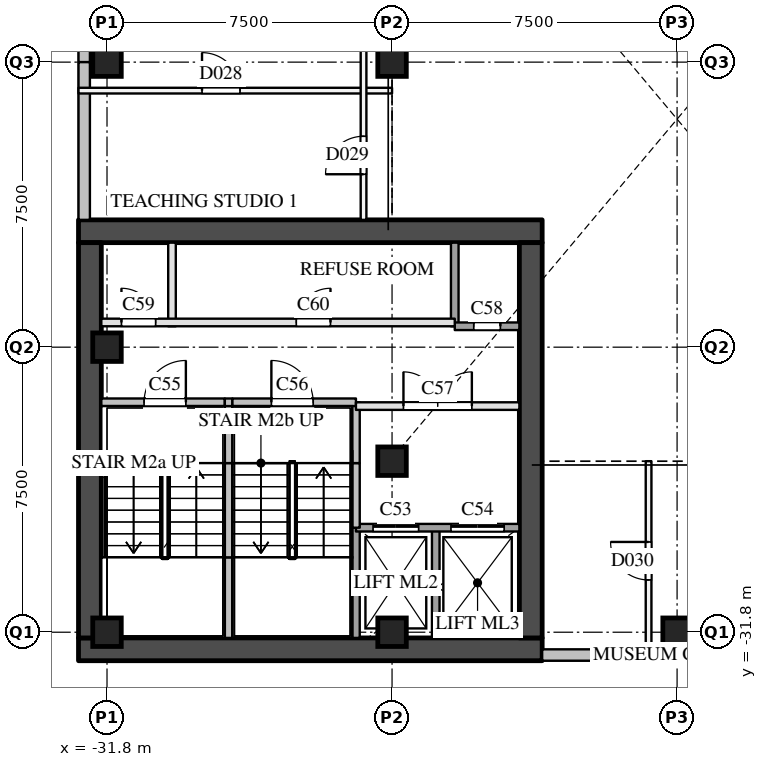
"""IFC4 building model, lengths in metres.
Left out: names, types, materials, properties, quantities, classifications, styles, units other than length and angle.
Written with IfcOpenShell. Run it as: python <this file> out.ifc"""

import sys

from ifc_helpers import new_model, si_unit, direction, frame, frame_2d, origin, origin_2d, place, context, subcontext, project, spatial, rectangle, extrude, element, fill, save


model = new_model("IFC4")
c1 = context("Model", 3, precision=1e-05, world=origin(), true_north=direction((0.0, 1.0)))
c2 = subcontext(c1, "Body", "Model", "MODEL_VIEW")
j1 = project(units=[si_unit("LENGTHUNIT", "METRE"), si_unit("PLANEANGLEUNIT", "RADIAN")], contexts=[c1])
p1 = place(None, origin())
s1 = spatial("IfcSite", under=j1, at=p1, CompositionType="ELEMENT")
p2 = place(p1, origin())
s2 = spatial("IfcBuilding", under=s1, at=p2, CompositionType="ELEMENT")
p3 = place(p2, frame((0.0, 0.0, 8.0)))
s3 = spatial("IfcBuildingStorey", under=s2, at=p3, CompositionType="ELEMENT", Elevation=8.0)
for number, where, z_axis, x_axis in (
    (1, (-31.8, -31.8, 0.0), (0.0, 0.0, 1.0), (1.0, 0.0, 0.0)),
    (2, (-31.8, -24.3, 0.0), (0.0, 0.0, 1.0), (1.0, 0.0, 0.0)),
    (3, (-31.8, -16.8, 0.0), (0.0, 0.0, 1.0), (1.0, 0.0, 0.0)),
    (4, (-24.3, -31.8, 0.0), (0.0, 0.0, 1.0), (1.0, 0.0, 0.0)),
    (5, (-24.3, -16.8, 0.0), (0.0, 0.0, 1.0), (1.0, 0.0, 0.0)),
    (6, (-16.8, -31.8, 0.0), (0.0, 0.0, 1.0), (1.0, 0.0, 0.0)),
    (7, (-24.3, -27.3, 0.0), (0.0, 0.0, 1.0), (1.0, 0.0, 0.0)),
):
    element("IfcColumn", number, at=place(p3, frame(where, z_axis=z_axis, x_axis=x_axis)), inside=s3, PredefinedType="COLUMN", context=c2, shape_type="SweptSolid", body=[
        extrude(rectangle(XDim=0.75, YDim=0.75, at=origin_2d()), origin(), (0.0, 0.0, 1.0), 6.0),
    ])
p4 = place(p3, frame((-20.35, -32.4, 0.0), z_axis=(0.0, 0.0, 1.0), x_axis=(1.0, 0.0, 0.0)))
e8 = element("IfcWall", 8, at=p4, inside=s3, PredefinedType="SOLIDWALL", context=c2, shape_type="SweptSolid", body=[
    extrude(rectangle(XDim=3.55, YDim=0.3, at=frame_2d((1.775, 0.0))), origin(), (0.0, 0.0, 1.0), 5.59),
])
p5 = place(p3, frame((-16.8, -32.4, 0.0), z_axis=(0.0, 0.0, 1.0), x_axis=(1.0, 0.0, 0.0)))
e9 = element("IfcWall", 9, at=p5, inside=s3, PredefinedType="SOLIDWALL", context=c2, shape_type="SweptSolid", body=[
    extrude(rectangle(XDim=7.5, YDim=0.3, at=frame_2d((3.75, 0.0))), origin(), (0.0, 0.0, 1.0), 5.59),
])
p6 = place(p5, frame((1.95, 0.0, 2.4)))
e10 = element("IfcOpeningElement", 10, at=p6, cuts=e9, PredefinedType="OPENING", context=c2, shape_type="SweptSolid", body=[
    extrude(rectangle(XDim=3.6, YDim=1.2, at=frame_2d((1.8, 0.6))), frame((0.0, 0.16, 0.0), z_axis=(0.0, -1.0, 0.0), x_axis=(1.0, 0.0, 0.0)), (0.0, 0.0, 1.0), 0.32),
])
p7 = place(p3, frame((-32.4, -9.3, 0.0), z_axis=(0.0, 0.0, 1.0), x_axis=(0.0, -1.0, 0.0)))
e11 = element("IfcWall", 11, at=p7, inside=s3, PredefinedType="SOLIDWALL", context=c2, shape_type="SweptSolid", body=[
    extrude(rectangle(XDim=7.5, YDim=0.3, at=frame_2d((3.75, 0.0))), origin(), (0.0, 0.0, 1.0), 5.59),
])
p8 = place(p7, frame((1.95, 0.0, 2.4)))
e12 = element("IfcOpeningElement", 12, at=p8, cuts=e11, PredefinedType="OPENING", context=c2, shape_type="SweptSolid", body=[
    extrude(rectangle(XDim=3.6, YDim=1.2, at=frame_2d((1.8, 0.6))), frame((0.0, 0.16, 0.0), z_axis=(0.0, -1.0, 0.0), x_axis=(1.0, 0.0, 0.0)), (0.0, 0.0, 1.0), 0.32),
])
p9 = place(p3, frame((-32.4, -16.8, 0.0), z_axis=(0.0, 0.0, 1.0), x_axis=(0.0, -1.0, 0.0)))
e13 = element("IfcWall", 13, at=p9, inside=s3, PredefinedType="SOLIDWALL", context=c2, shape_type="SweptSolid", body=[
    extrude(rectangle(XDim=4.15, YDim=0.3, at=frame_2d((2.075, 0.0))), origin(), (0.0, 0.0, 1.0), 5.59),
])
for number, where, z_axis, x_axis in (
    (14, (-32.55, -32.25, 0.0), (0.0, 0.0, 1.0), (1.0, 0.0, 0.0)),
    (15, (-32.55, -21.25, 0.0), (0.0, 0.0, 1.0), (1.0, 0.0, 0.0)),
):
    element("IfcWall", number, at=place(p3, frame(where, z_axis=z_axis, x_axis=x_axis)), inside=s3, PredefinedType="SHEAR", context=c2, shape_type="SweptSolid", body=[
        extrude(rectangle(XDim=12.2, YDim=0.6, at=frame_2d((6.1, 0.0))), origin(), (0.0, 0.0, 1.0), 5.59),
    ])
for number, where, z_axis, x_axis in (
    (16, (-32.25, -31.95, 0.0), (0.0, 0.0, 1.0), (0.0, 1.0, 0.0)),
    (17, (-20.65, -31.95, 0.0), (0.0, 0.0, 1.0), (0.0, 1.0, 0.0)),
):
    element("IfcWall", number, at=place(p3, frame(where, z_axis=z_axis, x_axis=x_axis)), inside=s3, PredefinedType="SHEAR", context=c2, shape_type="SweptSolid", body=[
        extrude(rectangle(XDim=10.4, YDim=0.6, at=frame_2d((5.2, 0.0))), origin(), (0.0, 0.0, 1.0), 5.59),
    ])
p10 = place(p3, frame((-30.09, -23.75, 0.0), z_axis=(0.0, 0.0, 1.0), x_axis=(0.0, 1.0, 0.0)))
e18 = element("IfcWall", 18, at=p10, inside=s3, PredefinedType="PARTITIONING", context=c2, shape_type="SweptSolid", body=[
    extrude(rectangle(XDim=2.2, YDim=0.2, at=frame_2d((1.1, 0.0))), origin(), (0.0, 0.0, 1.0), 5.59),
])
p11 = place(p3, frame((-28.6, -31.95, 0.0), z_axis=(0.0, 0.0, 1.0), x_axis=(0.0, 1.0, 0.0)))
e19 = element("IfcWall", 19, at=p11, inside=s3, PredefinedType="SOLIDWALL", context=c2, shape_type="SweptSolid", body=[
    extrude(rectangle(XDim=2.12, YDim=0.2, at=frame_2d((1.06, 0.0))), origin(), (0.0, 0.0, 1.0), 5.59),
])
p12 = place(p3, frame((-28.6, -29.83, 0.0), z_axis=(0.0, 0.0, 1.0), x_axis=(0.0, 1.0, 0.0)))
e20 = element("IfcWall", 20, at=p12, inside=s3, PredefinedType="SOLIDWALL", context=c2, shape_type="SweptSolid", body=[
    extrude(rectangle(XDim=2.48, YDim=0.2, at=frame_2d((1.24, 0.0))), origin(), (0.0, 0.0, 1.0), 5.59),
])
p13 = place(p3, frame((-28.6, -27.35, 0.0), z_axis=(0.0, 0.0, 1.0), x_axis=(0.0, 1.0, 0.0)))
e21 = element("IfcWall", 21, at=p13, inside=s3, PredefinedType="SOLIDWALL", context=c2, shape_type="SweptSolid", body=[
    extrude(rectangle(XDim=1.6, YDim=0.2, at=frame_2d((0.8, 0.0))), origin(), (0.0, 0.0, 1.0), 5.59),
])
p14 = place(p3, frame((-25.25, -31.95, 0.0), z_axis=(0.0, 0.0, 1.0), x_axis=(0.0, 1.0, 0.0)))
e22 = element("IfcWall", 22, at=p14, inside=s3, PredefinedType="SOLIDWALL", context=c2, shape_type="SweptSolid", body=[
    extrude(rectangle(XDim=2.9, YDim=0.2, at=frame_2d((1.45, 0.0))), origin(), (0.0, 0.0, 1.0), 5.59),
])
p15 = place(p3, frame((-25.25, -29.05, 0.0), z_axis=(0.0, 0.0, 1.0), x_axis=(0.0, 1.0, 0.0)))
e23 = element("IfcWall", 23, at=p15, inside=s3, PredefinedType="SOLIDWALL", context=c2, shape_type="SweptSolid", body=[
    extrude(rectangle(XDim=1.7, YDim=0.2, at=frame_2d((0.85, 0.0))), origin(), (0.0, 0.0, 1.0), 5.59),
])
p16 = place(p3, frame((-25.25, -27.35, 0.0), z_axis=(0.0, 0.0, 1.0), x_axis=(0.0, 1.0, 0.0)))
e24 = element("IfcWall", 24, at=p16, inside=s3, PredefinedType="SOLIDWALL", context=c2, shape_type="SweptSolid", body=[
    extrude(rectangle(XDim=1.6, YDim=0.2, at=frame_2d((0.8, 0.0))), origin(), (0.0, 0.0, 1.0), 5.59),
])
p17 = place(p3, frame((-23.15, -31.95, 0.0), z_axis=(0.0, 0.0, 1.0), x_axis=(0.0, 1.0, 0.0)))
e25 = element("IfcWall", 25, at=p17, inside=s3, PredefinedType="SOLIDWALL", context=c2, shape_type="SweptSolid", body=[
    extrude(rectangle(XDim=2.9, YDim=0.2, at=frame_2d((1.45, 0.0))), origin(), (0.0, 0.0, 1.0), 5.59),
])
p18 = place(p3, frame((-22.65, -23.75, 0.0), z_axis=(0.0, 0.0, 1.0), x_axis=(0.0, 1.0, 0.0)))
e26 = element("IfcWall", 26, at=p18, inside=s3, PredefinedType="SOLIDWALL", context=c2, shape_type="SweptSolid", body=[
    extrude(rectangle(XDim=2.2, YDim=0.2, at=frame_2d((1.1, 0.0))), origin(), (0.0, 0.0, 1.0), 5.59),
])
p19 = place(p3, frame((-25.25, -29.05, 0.0), z_axis=(0.0, 0.0, 1.0), x_axis=(1.0, 0.0, 0.0)))
e27 = element("IfcWall", 27, at=p19, inside=s3, PredefinedType="SOLIDWALL", context=c2, shape_type="SweptSolid", body=[
    extrude(rectangle(XDim=4.3, YDim=0.2, at=frame_2d((2.15, 0.0))), origin(), (0.0, 0.0, 1.0), 5.59),
])
p20 = place(p19, frame((0.45, 0.0, 0.0)))
e28 = element("IfcOpeningElement", 28, at=p20, cuts=e27, PredefinedType="OPENING", context=c2, shape_type="SweptSolid", body=[
    extrude(rectangle(XDim=1.2, YDim=2.1, at=frame_2d((0.6, 1.05))), frame((0.0, 0.11, 0.0), z_axis=(0.0, -1.0, 0.0), x_axis=(1.0, 0.0, 0.0)), (0.0, 0.0, 1.0), 0.22),
])
p21 = place(p19, frame((2.5, 0.0, 0.0)))
e29 = element("IfcOpeningElement", 29, at=p21, cuts=e27, PredefinedType="OPENING", context=c2, shape_type="SweptSolid", body=[
    extrude(rectangle(XDim=1.4, YDim=2.1, at=frame_2d((0.7, 1.05))), frame((0.0, 0.11, 0.0), z_axis=(0.0, -1.0, 0.0), x_axis=(1.0, 0.0, 0.0)), (0.0, 0.0, 1.0), 0.22),
])
p22 = place(p3, frame((-25.25, -25.85, 0.0), z_axis=(0.0, 0.0, 1.0), x_axis=(1.0, 0.0, 0.0)))
e30 = element("IfcWall", 30, at=p22, inside=s3, PredefinedType="PARTITIONING", context=c2, shape_type="SweptSolid", body=[
    extrude(rectangle(XDim=4.3, YDim=0.2, at=frame_2d((2.15, 0.0))), origin(), (0.0, 0.0, 1.0), 5.59),
])
p23 = place(p22, frame((1.25, 0.0, 0.0)))
e31 = element("IfcOpeningElement", 31, at=p23, cuts=e30, PredefinedType="OPENING", context=c2, shape_type="SweptSolid", body=[
    extrude(rectangle(XDim=1.8, YDim=2.1, at=frame_2d((0.9, 1.05))), frame((0.0, 0.11, 0.0), z_axis=(0.0, -1.0, 0.0), x_axis=(1.0, 0.0, 0.0)), (0.0, 0.0, 1.0), 0.22),
])
p24 = place(p3, frame((-31.95, -25.75, 0.0), z_axis=(0.0, 0.0, 1.0), x_axis=(1.0, 0.0, 0.0)))
e32 = element("IfcWall", 32, at=p24, inside=s3, PredefinedType="SOLIDWALL", context=c2, shape_type="SweptSolid", body=[
    extrude(rectangle(XDim=3.25, YDim=0.2, at=frame_2d((1.625, 0.0))), origin(), (0.0, 0.0, 1.0), 5.59),
])
p25 = place(p24, frame((1.125, 0.0, 0.0)))
e33 = element("IfcOpeningElement", 33, at=p25, cuts=e32, PredefinedType="OPENING", context=c2, shape_type="SweptSolid", body=[
    extrude(rectangle(XDim=1.1, YDim=2.1, at=frame_2d((0.55, 1.05))), frame((0.0, 0.11, 0.0), z_axis=(0.0, -1.0, 0.0), x_axis=(1.0, 0.0, 0.0)), (0.0, 0.0, 1.0), 0.22),
])
p26 = place(p3, frame((-28.7, -25.75, 0.0), z_axis=(0.0, 0.0, 1.0), x_axis=(1.0, 0.0, 0.0)))
e34 = element("IfcWall", 34, at=p26, inside=s3, PredefinedType="SOLIDWALL", context=c2, shape_type="SweptSolid", body=[
    extrude(rectangle(XDim=0.2, YDim=0.2, at=frame_2d((0.1, 0.0))), origin(), (0.0, 0.0, 1.0), 5.59),
])
p27 = place(p3, frame((-28.5, -25.75, 0.0), z_axis=(0.0, 0.0, 1.0), x_axis=(1.0, 0.0, 0.0)))
e35 = element("IfcWall", 35, at=p27, inside=s3, PredefinedType="SOLIDWALL", context=c2, shape_type="SweptSolid", body=[
    extrude(rectangle(XDim=3.25, YDim=0.2, at=frame_2d((1.625, 0.0))), origin(), (0.0, 0.0, 1.0), 5.59),
])
p28 = place(p27, frame((1.025, 0.0, 0.0)))
e36 = element("IfcOpeningElement", 36, at=p28, cuts=e35, PredefinedType="OPENING", context=c2, shape_type="SweptSolid", body=[
    extrude(rectangle(XDim=1.1, YDim=2.1, at=frame_2d((0.55, 1.05))), frame((0.0, 0.11, 0.0), z_axis=(0.0, -1.0, 0.0), x_axis=(1.0, 0.0, 0.0)), (0.0, 0.0, 1.0), 0.22),
])
p29 = place(p3, frame((-31.95, -23.65, 0.0), z_axis=(0.0, 0.0, 1.0), x_axis=(1.0, 0.0, 0.0)))
e37 = element("IfcWall", 37, at=p29, inside=s3, PredefinedType="PARTITIONING", context=c2, shape_type="SweptSolid", body=[
    extrude(rectangle(XDim=9.3, YDim=0.2, at=frame_2d((4.65, 0.0))), origin(), (0.0, 0.0, 1.0), 5.59),
])
p30 = place(p29, frame((0.53, 0.0, 0.0)))
e38 = element("IfcOpeningElement", 38, at=p30, cuts=e37, PredefinedType="OPENING", context=c2, shape_type="SweptSolid", body=[
    extrude(rectangle(XDim=0.9, YDim=2.1, at=frame_2d((0.45, 1.05))), frame((0.0, 0.11, 0.0), z_axis=(0.0, -1.0, 0.0), x_axis=(1.0, 0.0, 0.0)), (0.0, 0.0, 1.0), 0.22),
])
p31 = place(p29, frame((5.13, 0.0, 0.0)))
e39 = element("IfcOpeningElement", 39, at=p31, cuts=e37, PredefinedType="OPENING", context=c2, shape_type="SweptSolid", body=[
    extrude(rectangle(XDim=0.9, YDim=2.1, at=frame_2d((0.45, 1.05))), frame((0.0, 0.11, 0.0), z_axis=(0.0, -1.0, 0.0), x_axis=(1.0, 0.0, 0.0)), (0.0, 0.0, 1.0), 0.22),
])
p32 = place(p3, frame((-22.65, -23.75, 0.0), z_axis=(0.0, 0.0, 1.0), x_axis=(1.0, 0.0, 0.0)))
e40 = element("IfcWall", 40, at=p32, inside=s3, PredefinedType="SOLIDWALL", context=c2, shape_type="SweptSolid", body=[
    extrude(rectangle(XDim=1.7, YDim=0.2, at=frame_2d((0.85, 0.0))), origin(), (0.0, 0.0, 1.0), 5.59),
])
p33 = place(p32, frame((0.5, 0.0, 0.0)))
e41 = element("IfcOpeningElement", 41, at=p33, cuts=e40, PredefinedType="OPENING", context=c2, shape_type="SweptSolid", body=[
    extrude(rectangle(XDim=0.7, YDim=2.1, at=frame_2d((0.35, 1.05))), frame((0.0, 0.11, 0.0), z_axis=(0.0, -1.0, 0.0), x_axis=(1.0, 0.0, 0.0)), (0.0, 0.0, 1.0), 0.22),
])
p34 = place(p3, frame((-25.05, -17.55, 0.0), z_axis=(0.0, 0.0, 1.0), x_axis=(1.0, 0.0, 0.0)))
e42 = element("IfcWall", 42, at=p34, inside=s3, PredefinedType="PARTITIONING", context=c2, shape_type="SweptSolid", body=[
    extrude(rectangle(XDim=0.75, YDim=0.15, at=frame_2d((0.375, 0.0))), origin(), (0.0, 0.0, 1.0), 4.79),
])
p35 = place(p3, frame((-32.55, -17.55, 0.0), z_axis=(0.0, 0.0, 1.0), x_axis=(1.0, 0.0, 0.0)))
e43 = element("IfcWall", 43, at=p35, inside=s3, PredefinedType="PARTITIONING", context=c2, shape_type="SweptSolid", body=[
    extrude(rectangle(XDim=7.5, YDim=0.15, at=frame_2d((3.75, 0.0))), origin(), (0.0, 0.0, 1.0), 4.79),
])
p36 = place(p35, frame((3.25, 0.0, 0.0)))
e44 = element("IfcOpeningElement", 44, at=p36, cuts=e43, PredefinedType="OPENING", context=c2, shape_type="SweptSolid", body=[
    extrude(rectangle(XDim=1.0, YDim=2.1, at=frame_2d((0.5, 1.05))), frame((0.0, 0.085, 0.0), z_axis=(0.0, -1.0, 0.0), x_axis=(1.0, 0.0, 0.0)), (0.0, 0.0, 1.0), 0.17),
])
p37 = place(p3, frame((-25.05, -20.95, 0.0), z_axis=(0.0, 0.0, 1.0), x_axis=(0.0, 1.0, 0.0)))
e45 = element("IfcWall", 45, at=p37, inside=s3, PredefinedType="PARTITIONING", context=c2, shape_type="SweptSolid", body=[
    extrude(rectangle(XDim=11.65, YDim=0.15, at=frame_2d((5.825, 0.0))), origin(), (0.0, 0.0, 1.0), 4.79),
])
p38 = place(p37, frame((7.025, 0.0, 0.0)))
e46 = element("IfcOpeningElement", 46, at=p38, cuts=e45, PredefinedType="OPENING", context=c2, shape_type="SweptSolid", body=[
    extrude(rectangle(XDim=1.0, YDim=2.1, at=frame_2d((0.5, 1.05))), frame((0.0, 0.085, 0.0), z_axis=(0.0, -1.0, 0.0), x_axis=(1.0, 0.0, 0.0)), (0.0, 0.0, 1.0), 0.17),
])
p39 = place(p37, frame((1.2, 0.0, 0.0)))
e47 = element("IfcOpeningElement", 47, at=p39, cuts=e45, PredefinedType="OPENING", context=c2, shape_type="SweptSolid", body=[
    extrude(rectangle(XDim=1.0, YDim=2.1, at=frame_2d((0.5, 1.05))), frame((0.0, 0.085, 0.0), z_axis=(0.0, -1.0, 0.0), x_axis=(1.0, 0.0, 0.0)), (0.0, 0.0, 1.0), 0.17),
])
p40 = place(p3, frame((-17.55, -32.55, 0.0), z_axis=(0.0, 0.0, 1.0), x_axis=(0.0, 1.0, 0.0)))
e48 = element("IfcWall", 48, at=p40, inside=s3, PredefinedType="PARTITIONING", context=c2, shape_type="SweptSolid", body=[
    extrude(rectangle(XDim=5.25, YDim=0.15, at=frame_2d((2.625, 0.0))), origin(), (0.0, 0.0, 1.0), 5.59),
])
p41 = place(p40, frame((2.125, 0.0, 0.0)))
e49 = element("IfcOpeningElement", 49, at=p41, cuts=e48, PredefinedType="OPENING", context=c2, shape_type="SweptSolid", body=[
    extrude(rectangle(XDim=1.0, YDim=2.1, at=frame_2d((0.5, 1.05))), frame((0.0, 0.085, 0.0), z_axis=(0.0, -1.0, 0.0), x_axis=(1.0, 0.0, 0.0)), (0.0, 0.0, 1.0), 0.17),
])
p42 = place(p20, origin())
e50 = element("IfcDoor", 50, at=p42, inside=s3, OperationType="SLIDING_TO_LEFT", PredefinedType="DOOR", context=c2, shape_type="SweptSolid", body=[
    extrude(rectangle(XDim=1.2, YDim=2.1, at=frame_2d((0.6, 1.05))), frame((0.0, 0.025, 0.0), z_axis=(0.0, -1.0, 0.0), x_axis=(1.0, 0.0, 0.0)), (0.0, 0.0, 1.0), 0.05),
])
fill(e28, e50)
p43 = place(p21, origin())
e51 = element("IfcDoor", 51, at=p43, inside=s3, OperationType="SLIDING_TO_LEFT", PredefinedType="DOOR", context=c2, shape_type="SweptSolid", body=[
    extrude(rectangle(XDim=1.4, YDim=2.1, at=frame_2d((0.7, 1.05))), frame((0.0, 0.025, 0.0), z_axis=(0.0, -1.0, 0.0), x_axis=(1.0, 0.0, 0.0)), (0.0, 0.0, 1.0), 0.05),
])
fill(e29, e51)
p44 = place(p25, origin())
e52 = element("IfcDoor", 52, at=p44, inside=s3, OperationType="SINGLE_SWING_RIGHT", PredefinedType="DOOR", context=c2, shape_type="SweptSolid", body=[
    extrude(rectangle(XDim=1.1, YDim=2.1, at=frame_2d((0.55, 1.05))), frame((0.0, 0.025, 0.0), z_axis=(0.0, -1.0, 0.0), x_axis=(1.0, 0.0, 0.0)), (0.0, 0.0, 1.0), 0.05),
])
fill(e33, e52)
p45 = place(p28, origin())
e53 = element("IfcDoor", 53, at=p45, inside=s3, OperationType="SINGLE_SWING_LEFT", PredefinedType="DOOR", context=c2, shape_type="SweptSolid", body=[
    extrude(rectangle(XDim=1.1, YDim=2.1, at=frame_2d((0.55, 1.05))), frame((0.0, 0.025, 0.0), z_axis=(0.0, -1.0, 0.0), x_axis=(1.0, 0.0, 0.0)), (0.0, 0.0, 1.0), 0.05),
])
fill(e36, e53)
p46 = place(p23, origin())
e54 = element("IfcDoor", 54, at=p46, inside=s3, OperationType="DOUBLE_DOOR_SINGLE_SWING", PredefinedType="DOOR", context=c2, shape_type="SweptSolid", body=[
    extrude(rectangle(XDim=1.8, YDim=2.1, at=frame_2d((0.9, 1.05))), frame((0.0, 0.025, 0.0), z_axis=(0.0, -1.0, 0.0), x_axis=(1.0, 0.0, 0.0)), (0.0, 0.0, 1.0), 0.05),
])
fill(e31, e54)
p47 = place(p33, origin())
e55 = element("IfcDoor", 55, at=p47, inside=s3, OperationType="SINGLE_SWING_RIGHT", PredefinedType="DOOR", context=c2, shape_type="SweptSolid", body=[
    extrude(rectangle(XDim=0.7, YDim=2.1, at=frame_2d((0.35, 1.05))), frame((0.0, 0.025, 0.0), z_axis=(0.0, -1.0, 0.0), x_axis=(1.0, 0.0, 0.0)), (0.0, 0.0, 1.0), 0.05),
])
fill(e41, e55)
p48 = place(p30, origin())
e56 = element("IfcDoor", 56, at=p48, inside=s3, OperationType="SINGLE_SWING_LEFT", PredefinedType="DOOR", context=c2, shape_type="SweptSolid", body=[
    extrude(rectangle(XDim=0.9, YDim=2.1, at=frame_2d((0.45, 1.05))), frame((0.0, 0.025, 0.0), z_axis=(0.0, -1.0, 0.0), x_axis=(1.0, 0.0, 0.0)), (0.0, 0.0, 1.0), 0.05),
])
fill(e38, e56)
p49 = place(p31, origin())
e57 = element("IfcDoor", 57, at=p49, inside=s3, OperationType="SINGLE_SWING_RIGHT", PredefinedType="DOOR", context=c2, shape_type="SweptSolid", body=[
    extrude(rectangle(XDim=0.9, YDim=2.1, at=frame_2d((0.45, 1.05))), frame((0.0, 0.025, 0.0), z_axis=(0.0, -1.0, 0.0), x_axis=(1.0, 0.0, 0.0)), (0.0, 0.0, 1.0), 0.05),
])
fill(e39, e57)
p50 = place(p36, origin())
e58 = element("IfcDoor", 58, at=p50, inside=s3, OperationType="SINGLE_SWING_LEFT", PredefinedType="DOOR", context=c2, shape_type="SweptSolid", body=[
    extrude(rectangle(XDim=1.0, YDim=2.1, at=frame_2d((0.5, 1.05))), frame((0.0, 0.025, 0.0), z_axis=(0.0, -1.0, 0.0), x_axis=(1.0, 0.0, 0.0)), (0.0, 0.0, 1.0), 0.05),
])
fill(e44, e58)
p51 = place(p39, origin())
e59 = element("IfcDoor", 59, at=p51, inside=s3, OperationType="SINGLE_SWING_LEFT", PredefinedType="DOOR", context=c2, shape_type="SweptSolid", body=[
    extrude(rectangle(XDim=1.0, YDim=2.1, at=frame_2d((0.5, 1.05))), frame((0.0, 0.025, 0.0), z_axis=(0.0, -1.0, 0.0), x_axis=(1.0, 0.0, 0.0)), (0.0, 0.0, 1.0), 0.05),
])
fill(e47, e59)
p52 = place(p41, origin())
e60 = element("IfcDoor", 60, at=p52, inside=s3, OperationType="SINGLE_SWING_RIGHT", PredefinedType="DOOR", context=c2, shape_type="SweptSolid", body=[
    extrude(rectangle(XDim=1.0, YDim=2.1, at=frame_2d((0.5, 1.05))), frame((0.0, 0.025, 0.0), z_axis=(0.0, -1.0, 0.0), x_axis=(1.0, 0.0, 0.0)), (0.0, 0.0, 1.0), 0.05),
])
fill(e49, e60)
save(model, sys.argv[1])
